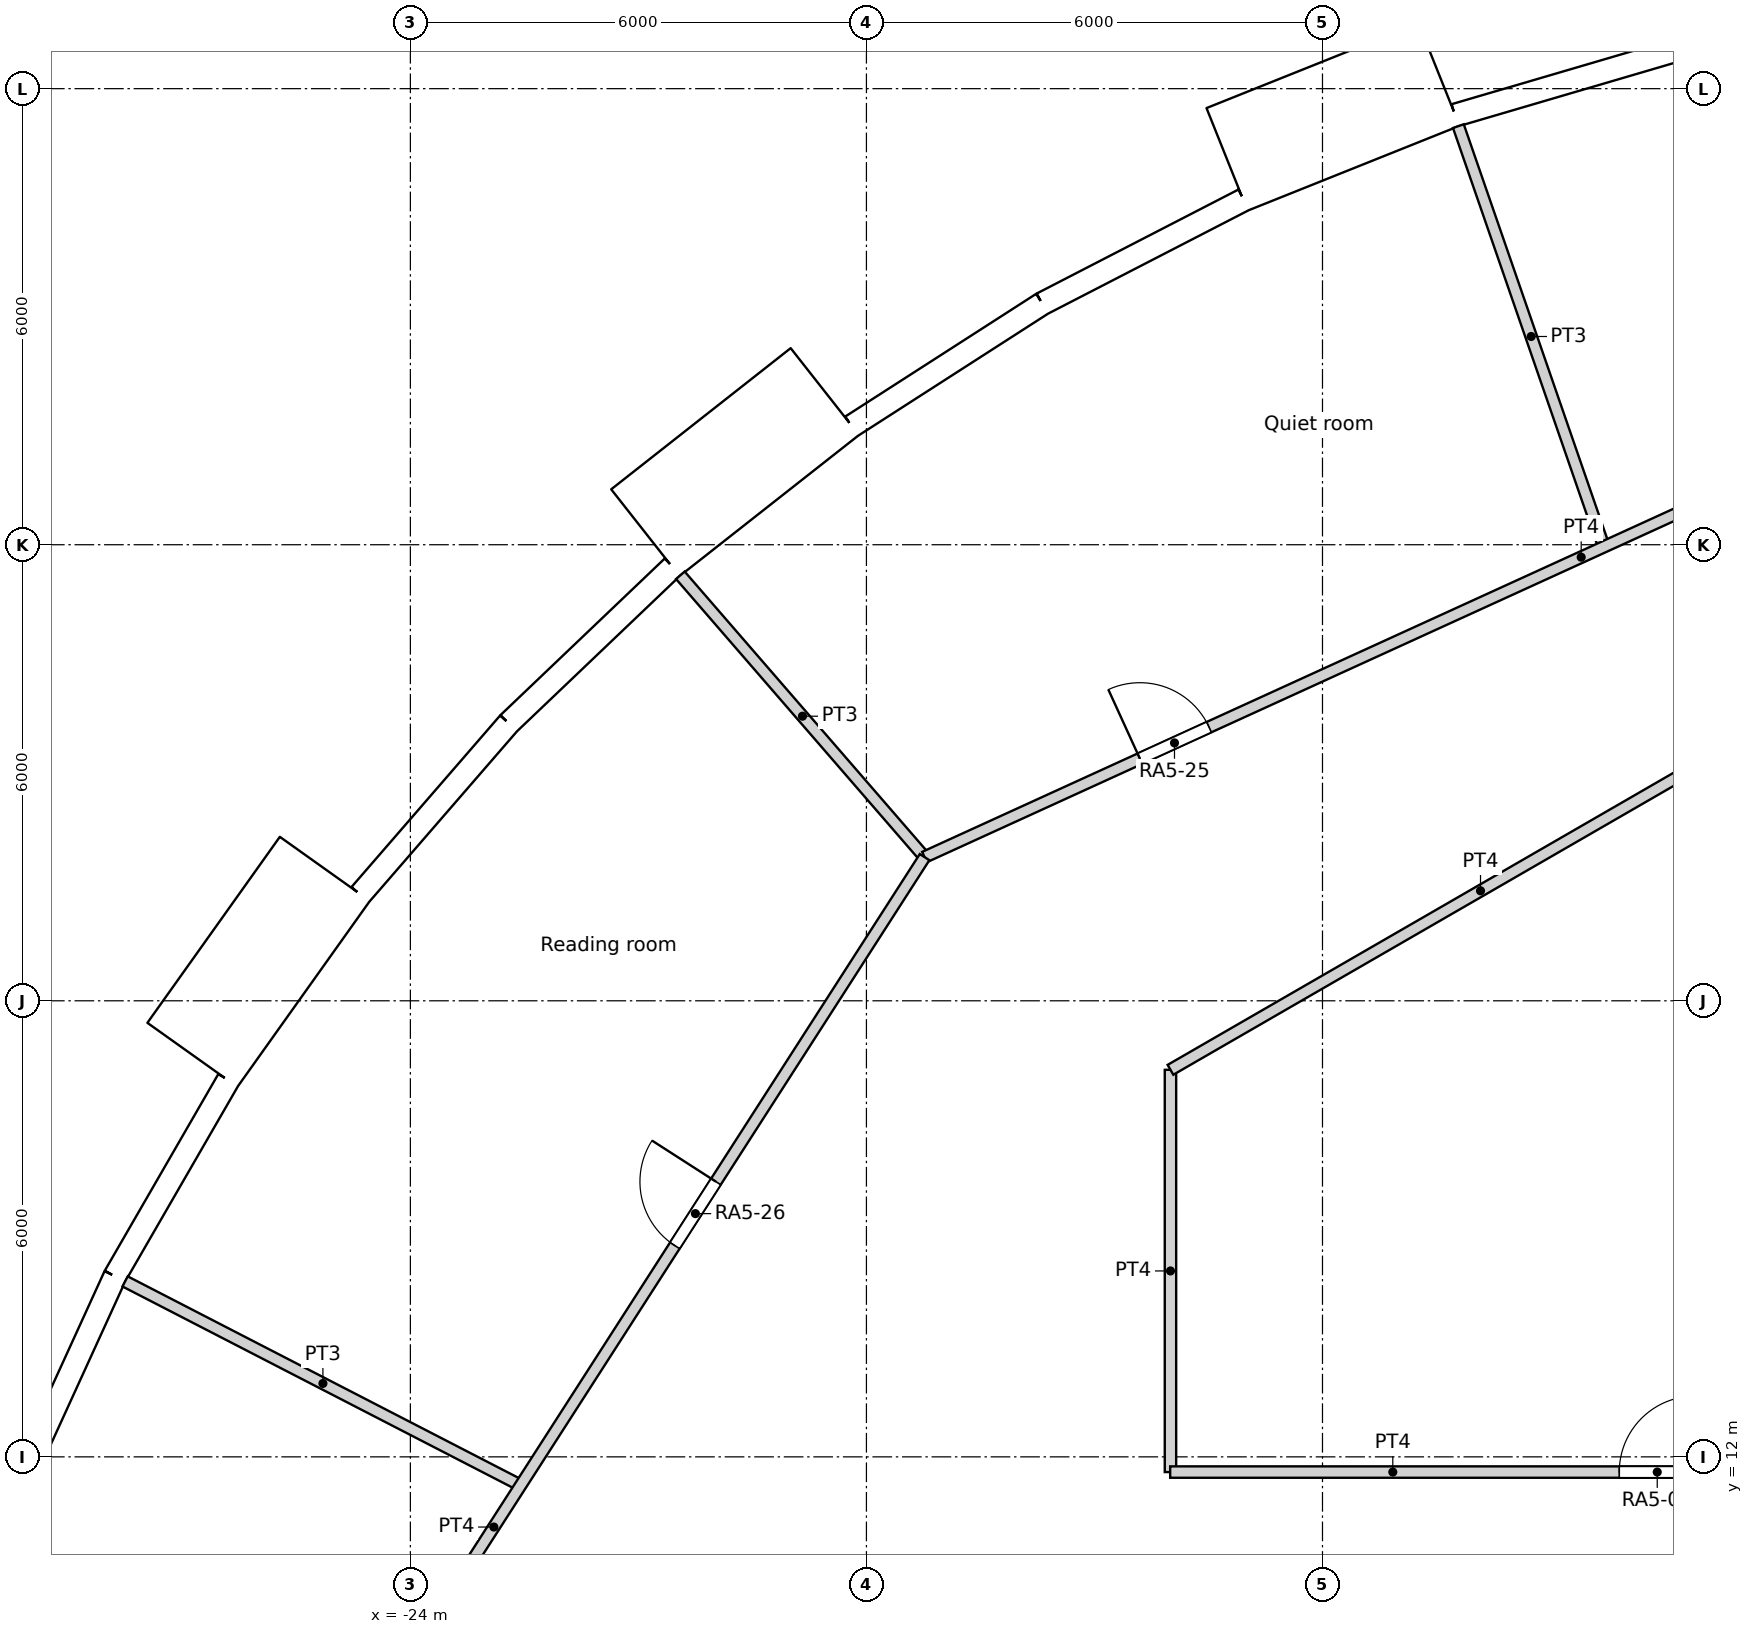
"""IFC4 building model, lengths in metres.
Left out: names, types, materials, properties, quantities, classifications, styles, units other than length and angle.
Written with IfcOpenShell. Run it as: python <this file> out.ifc"""

import sys

from ifc_helpers import new_model, si_unit, direction, frame, frame_2d, origin, origin_2d, place, context, subcontext, project, spatial, rectangle, circle, extrude, element, fill, save


model = new_model("IFC4")
c1 = context("Model", 3, precision=1e-05, world=origin(), true_north=direction((0.0, 1.0)))
c2 = subcontext(c1, "Body", "Model", "MODEL_VIEW")
j1 = project(units=[si_unit("LENGTHUNIT", "METRE"), si_unit("PLANEANGLEUNIT", "RADIAN")], contexts=[c1])
p1 = place(None, origin())
s1 = spatial("IfcSite", under=j1, at=p1, CompositionType="ELEMENT")
p2 = place(p1, origin())
s2 = spatial("IfcBuilding", under=s1, at=p2, CompositionType="ELEMENT")
p3 = place(p2, frame((0.0, 0.0, 71.4)))
s3 = spatial("IfcBuildingStorey", under=s2, at=p3, CompositionType="ELEMENT", Elevation=71.4)
for number, where, z_axis, x_axis in (
    (1, (-9.902, 28.61, 0.0), (0.0, 0.0, 1.0), (1.0, 0.0, 0.0)),
    (2, (-15.137, 26.219, 0.0), (0.0, 0.0, 1.0), (1.0, 0.0, 0.0)),
    (3, (-19.826, 22.88, 0.0), (0.0, 0.0, 1.0), (1.0, 0.0, 0.0)),
    (4, (-23.797, 18.715, 0.0), (0.0, 0.0, 1.0), (1.0, 0.0, 0.0)),
    (5, (-26.909, 13.873, 0.0), (0.0, 0.0, 1.0), (1.0, 0.0, 0.0)),
):
    element("IfcColumn", number, at=place(p3, frame(where, z_axis=z_axis, x_axis=x_axis)), inside=s3, PredefinedType="COLUMN", context=c2, shape_type="SweptSolid", body=[
        extrude(circle(Radius=0.6, at=origin_2d()), origin(), (0.0, 0.0, 1.0), 3.6),
    ])
for number, where, z_axis, x_axis in (
    (6, (-7.04, 23.516, 0.0), (0.0, 0.0, 1.0), (1.0, 0.0, 0.0)),
    (7, (-12.274, 21.259, 0.0), (0.0, 0.0, 1.0), (1.0, 0.0, 0.0)),
    (8, (-16.846, 17.855, 0.0), (0.0, 0.0, 1.0), (1.0, 0.0, 0.0)),
    (9, (-20.509, 13.489, 0.0), (0.0, 0.0, 1.0), (1.0, 0.0, 0.0)),
):
    element("IfcColumn", number, at=place(p3, frame(where, z_axis=z_axis, x_axis=x_axis)), inside=s3, PredefinedType="COLUMN", context=c2, shape_type="SweptSolid", body=[
        extrude(circle(Radius=0.65, at=origin_2d()), origin(), (0.0, 0.0, 1.0), 3.6),
    ])
for number, where, z_axis, x_axis in (
    (10, (-9.411, 16.301, 0.0), (0.0, 0.0, 1.0), (1.0, 0.0, 0.0)),
    (11, (-13.798, 12.802, 0.0), (0.0, 0.0, 1.0), (1.0, 0.0, 0.0)),
):
    element("IfcColumn", number, at=place(p3, frame(where, z_axis=z_axis, x_axis=x_axis)), inside=s3, PredefinedType="COLUMN", context=c2, shape_type="SweptSolid", body=[
        extrude(circle(Radius=0.7, at=origin_2d()), origin(), (0.0, 0.0, 1.0), 3.6),
    ])
p4 = place(p3, frame((-4.471, 31.054, 0.0), z_axis=(0.0, 0.0, 1.0), x_axis=(-0.981924535406, -0.189272836848, 0.0)))
e12 = element("IfcWall", 12, at=p4, inside=s3, PredefinedType="SOLIDWALL", context=c2, shape_type="SweptSolid", body=[
    extrude(rectangle(XDim=2.98, YDim=0.3, at=frame_2d((1.49, 0.0))), origin(), (0.0, 0.0, 1.0), 3.15),
])
p5 = place(p4, frame((1.49, 0.0, 1.55)))
e13 = element("IfcOpeningElement", 13, at=p5, cuts=e12, PredefinedType="OPENING", context=c2, shape_type="SweptSolid", body=[
    extrude(circle(Radius=0.9, at=origin_2d()), frame((0.0, 0.16, 0.0), z_axis=(0.0, -1.0, 0.0), x_axis=(1.0, 0.0, 0.0)), (0.0, 0.0, 1.0), 0.32),
])
p6 = place(p3, frame((-7.397, 30.49, 0.0), z_axis=(0.0, 0.0, 1.0), x_axis=(-0.959507586834, -0.28168278401, 0.0)))
e14 = element("IfcWall", 14, at=p6, inside=s3, PredefinedType="SOLIDWALL", context=c2, shape_type="SweptSolid", body=[
    extrude(rectangle(XDim=2.98, YDim=0.3, at=frame_2d((1.49, 0.0))), origin(), (0.0, 0.0, 1.0), 3.15),
])
p7 = place(p6, frame((1.49, 0.0, 1.55)))
e15 = element("IfcOpeningElement", 15, at=p7, cuts=e14, PredefinedType="OPENING", context=c2, shape_type="SweptSolid", body=[
    extrude(circle(Radius=0.9, at=origin_2d()), frame((0.0, 0.16, 0.0), z_axis=(0.0, -1.0, 0.0), x_axis=(1.0, 0.0, 0.0)), (0.0, 0.0, 1.0), 0.32),
])
p8 = place(p3, frame((-10.469, 30.185, -0.45), z_axis=(0.0, 0.0, 1.0), x_axis=(-0.928358776184, -0.371685327504, 0.0)))
e16 = element("IfcWall", 16, at=p8, inside=s3, PredefinedType="ELEMENTEDWALL", context=c2, shape_type="SweptSolid", body=[
    extrude(rectangle(XDim=3.0, YDim=1.45, at=frame_2d((1.5, 0.0))), origin(), (0.0, 0.0, 1.0), 3.6),
])
p9 = place(p8, frame((1.5, 0.0, 2.0)))
e17 = element("IfcOpeningElement", 17, at=p9, cuts=e16, PredefinedType="OPENING", context=c2, shape_type="SweptSolid", body=[
    extrude(circle(Radius=0.9, at=origin_2d()), frame((0.0, 0.735, 0.0), z_axis=(0.0, -1.0, 0.0), x_axis=(1.0, 0.0, 0.0)), (0.0, 0.0, 1.0), 1.47),
])
p10 = place(p3, frame((-13.039, 28.536, 0.0), z_axis=(0.0, 0.0, 1.0), x_axis=(-0.888853225096, -0.4581920386, 0.0)))
e18 = element("IfcWall", 18, at=p10, inside=s3, PredefinedType="SOLIDWALL", context=c2, shape_type="SweptSolid", body=[
    extrude(rectangle(XDim=2.979, YDim=0.3, at=frame_2d((1.49, 0.0))), origin(), (0.0, 0.0, 1.0), 3.15),
])
p11 = place(p10, frame((1.49, 0.0, 1.55)))
e19 = element("IfcOpeningElement", 19, at=p11, cuts=e18, PredefinedType="OPENING", context=c2, shape_type="SweptSolid", body=[
    extrude(circle(Radius=0.9, at=origin_2d()), frame((0.0, 0.16, 0.0), z_axis=(0.0, -1.0, 0.0), x_axis=(1.0, 0.0, 0.0)), (0.0, 0.0, 1.0), 0.32),
])
p12 = place(p3, frame((-15.687, 27.171, 0.0), z_axis=(0.0, 0.0, 1.0), x_axis=(-0.84122372879, -0.540687190639, 0.0)))
e20 = element("IfcWall", 20, at=p12, inside=s3, PredefinedType="SOLIDWALL", context=c2, shape_type="SweptSolid", body=[
    extrude(rectangle(XDim=2.98, YDim=0.3, at=frame_2d((1.49, 0.0))), origin(), (0.0, 0.0, 1.0), 3.15),
])
p13 = place(p12, frame((1.49, 0.0, 1.55)))
e21 = element("IfcOpeningElement", 21, at=p13, cuts=e20, PredefinedType="OPENING", context=c2, shape_type="SweptSolid", body=[
    extrude(circle(Radius=0.9, at=origin_2d()), frame((0.0, 0.16, 0.0), z_axis=(0.0, -1.0, 0.0), x_axis=(1.0, 0.0, 0.0)), (0.0, 0.0, 1.0), 0.32),
])
p14 = place(p3, frame((-18.549, 26.013, -0.45), z_axis=(0.0, 0.0, 1.0), x_axis=(-0.786049992888, -0.618162930529, 0.0)))
e22 = element("IfcWall", 22, at=p14, inside=s3, PredefinedType="ELEMENTEDWALL", context=c2, shape_type="SweptSolid", body=[
    extrude(rectangle(XDim=3.0, YDim=1.45, at=frame_2d((1.5, 0.0))), origin(), (0.0, 0.0, 1.0), 3.6),
])
p15 = place(p14, frame((1.5, 0.0, 2.0)))
e23 = element("IfcOpeningElement", 23, at=p15, cuts=e22, PredefinedType="OPENING", context=c2, shape_type="SweptSolid", body=[
    extrude(circle(Radius=0.9, at=origin_2d()), frame((0.0, 0.735, 0.0), z_axis=(0.0, -1.0, 0.0), x_axis=(1.0, 0.0, 0.0)), (0.0, 0.0, 1.0), 1.47),
])
p16 = place(p3, frame((-20.55, 23.707, 0.0), z_axis=(0.0, 0.0, 1.0), x_axis=(-0.723744206617, -0.690068346896, 0.0)))
e24 = element("IfcWall", 24, at=p16, inside=s3, PredefinedType="SOLIDWALL", context=c2, shape_type="SweptSolid", body=[
    extrude(rectangle(XDim=2.98, YDim=0.3, at=frame_2d((1.49, 0.0))), origin(), (0.0, 0.0, 1.0), 3.15),
])
p17 = place(p16, frame((1.49, 0.0, 1.55)))
e25 = element("IfcOpeningElement", 25, at=p17, cuts=e24, PredefinedType="OPENING", context=c2, shape_type="SweptSolid", body=[
    extrude(circle(Radius=0.9, at=origin_2d()), frame((0.0, 0.16, 0.0), z_axis=(0.0, -1.0, 0.0), x_axis=(1.0, 0.0, 0.0)), (0.0, 0.0, 1.0), 0.32),
])
p18 = place(p3, frame((-22.707, 21.651, 0.0), z_axis=(0.0, 0.0, 1.0), x_axis=(-0.654830712471, -0.755775587066, 0.0)))
e26 = element("IfcWall", 26, at=p18, inside=s3, PredefinedType="SOLIDWALL", context=c2, shape_type="SweptSolid", body=[
    extrude(rectangle(XDim=2.98, YDim=0.3, at=frame_2d((1.49, 0.0))), origin(), (0.0, 0.0, 1.0), 3.15),
])
p19 = place(p18, frame((1.49, 0.0, 1.55)))
e27 = element("IfcOpeningElement", 27, at=p19, cuts=e26, PredefinedType="OPENING", context=c2, shape_type="SweptSolid", body=[
    extrude(circle(Radius=0.9, at=origin_2d()), frame((0.0, 0.16, 0.0), z_axis=(0.0, -1.0, 0.0), x_axis=(1.0, 0.0, 0.0)), (0.0, 0.0, 1.0), 0.32),
])
p20 = place(p3, frame((-25.126, 19.734, -0.45), z_axis=(0.0, 0.0, 1.0), x_axis=(-0.580090570606, -0.814551981088, 0.0)))
e28 = element("IfcWall", 28, at=p20, inside=s3, PredefinedType="ELEMENTEDWALL", context=c2, shape_type="SweptSolid", body=[
    extrude(rectangle(XDim=3.0, YDim=1.45, at=frame_2d((1.5, 0.0))), origin(), (0.0, 0.0, 1.0), 3.6),
])
p21 = place(p20, frame((1.5, 0.0, 2.0)))
e29 = element("IfcOpeningElement", 29, at=p21, cuts=e28, PredefinedType="OPENING", context=c2, shape_type="SweptSolid", body=[
    extrude(circle(Radius=0.9, at=origin_2d()), frame((0.0, 0.735, 0.0), z_axis=(0.0, -1.0, 0.0), x_axis=(1.0, 0.0, 0.0)), (0.0, 0.0, 1.0), 1.47),
])
p22 = place(p3, frame((-26.397, 16.957, 0.0), z_axis=(0.0, 0.0, 1.0), x_axis=(-0.499999078476, -0.866025935826, 0.0)))
e30 = element("IfcWall", 30, at=p22, inside=s3, PredefinedType="SOLIDWALL", context=c2, shape_type="SweptSolid", body=[
    extrude(rectangle(XDim=2.979, YDim=0.3, at=frame_2d((1.49, 0.0))), origin(), (0.0, 0.0, 1.0), 3.15),
])
p23 = place(p22, frame((1.49, 0.0, 1.55)))
e31 = element("IfcOpeningElement", 31, at=p23, cuts=e30, PredefinedType="OPENING", context=c2, shape_type="SweptSolid", body=[
    extrude(circle(Radius=0.9, at=origin_2d()), frame((0.0, 0.16, 0.0), z_axis=(0.0, -1.0, 0.0), x_axis=(1.0, 0.0, 0.0)), (0.0, 0.0, 1.0), 0.32),
])
p24 = place(p3, frame((-27.887, 14.377, 0.0), z_axis=(0.0, 0.0, 1.0), x_axis=(-0.415407317162, -0.909635509888, 0.0)))
e32 = element("IfcWall", 32, at=p24, inside=s3, PredefinedType="SOLIDWALL", context=c2, shape_type="SweptSolid", body=[
    extrude(rectangle(XDim=2.98, YDim=0.3, at=frame_2d((1.49, 0.0))), origin(), (0.0, 0.0, 1.0), 3.15),
])
p25 = place(p24, frame((1.49, 0.0, 1.55)))
e33 = element("IfcOpeningElement", 33, at=p25, cuts=e32, PredefinedType="OPENING", context=c2, shape_type="SweptSolid", body=[
    extrude(circle(Radius=0.9, at=origin_2d()), frame((0.0, 0.16, 0.0), z_axis=(0.0, -1.0, 0.0), x_axis=(1.0, 0.0, 0.0)), (0.0, 0.0, 1.0), 0.32),
])
p26 = place(p3, frame((-14.004, 11.8, 0.0), z_axis=(0.0, 0.0, 1.0), x_axis=(1.0, 0.0, 0.0)))
e34 = element("IfcWall", 34, at=p26, inside=s3, PredefinedType="PARTITIONING", context=c2, shape_type="SweptSolid", body=[
    extrude(rectangle(XDim=12.816, YDim=0.15, at=frame_2d((6.408, 0.0))), origin(), (0.0, 0.0, 1.0), 3.15),
])
p27 = place(p26, frame((5.908, 0.0, 0.0)))
e35 = element("IfcOpeningElement", 35, at=p27, cuts=e34, PredefinedType="OPENING", context=c2, shape_type="SweptSolid", body=[
    extrude(rectangle(XDim=1.0, YDim=2.04, at=frame_2d((0.5, 1.02))), frame((0.0, 0.075, 0.0), z_axis=(0.0, -1.0, 0.0), x_axis=(1.0, 0.0, 0.0)), (0.0, 0.0, 1.0), 0.15),
])
p28 = place(p3, frame((-14.0, 17.092, 0.0), z_axis=(0.0, 0.0, 1.0), x_axis=(0.86602719091, 0.499996904595, 0.0)))
e36 = element("IfcWall", 36, at=p28, inside=s3, PredefinedType="PARTITIONING", context=c2, shape_type="SweptSolid", body=[
    extrude(rectangle(XDim=9.42, YDim=0.15, at=frame_2d((4.71, 0.0))), origin(), (0.0, 0.0, 1.0), 3.15),
])
p29 = place(p3, frame((-14.0, 11.8, 0.0), z_axis=(0.0, 0.0, 1.0), x_axis=(0.0, 1.0, 0.0)))
e37 = element("IfcWall", 37, at=p29, inside=s3, PredefinedType="PARTITIONING", context=c2, shape_type="SweptSolid", body=[
    extrude(rectangle(XDim=5.292, YDim=0.15, at=frame_2d((2.646, 0.0))), origin(), (0.0, 0.0, 1.0), 3.15),
])
p30 = place(p3, frame((-17.236, 19.891, 0.0), z_axis=(0.0, 0.0, 1.0), x_axis=(0.909645678785, 0.415385049163, 0.0)))
e38 = element("IfcWall", 38, at=p30, inside=s3, PredefinedType="PARTITIONING", context=c2, shape_type="SweptSolid", body=[
    extrude(rectangle(XDim=14.829, YDim=0.15, at=frame_2d((7.415, 0.0))), origin(), (0.0, 0.0, 1.0), 3.15),
])
p31 = place(p30, frame((3.115, 0.0, 0.0)))
e39 = element("IfcOpeningElement", 39, at=p31, cuts=e38, PredefinedType="OPENING", context=c2, shape_type="SweptSolid", body=[
    extrude(rectangle(XDim=1.0, YDim=2.04, at=frame_2d((0.5, 1.02))), frame((0.0, 0.075, 0.0), z_axis=(0.0, -1.0, 0.0), x_axis=(1.0, 0.0, 0.0)), (0.0, 0.0, 1.0), 0.15),
])
p32 = place(p3, frame((-25.255, 7.416, 0.0), z_axis=(0.0, 0.0, 1.0), x_axis=(0.540805851332, 0.841147449123, 0.0)))
e40 = element("IfcWall", 40, at=p32, inside=s3, PredefinedType="PARTITIONING", context=c2, shape_type="SweptSolid", body=[
    extrude(rectangle(XDim=14.829, YDim=0.15, at=frame_2d((7.415, 0.0))), origin(), (0.0, 0.0, 1.0), 3.15),
])
p33 = place(p32, frame((8.754, 0.0, 0.0)))
e41 = element("IfcOpeningElement", 41, at=p33, cuts=e40, PredefinedType="OPENING", context=c2, shape_type="SweptSolid", body=[
    extrude(rectangle(XDim=1.0, YDim=2.04, at=frame_2d((0.5, 1.02))), frame((0.0, 0.075, 0.0), z_axis=(0.0, -1.0, 0.0), x_axis=(1.0, 0.0, 0.0)), (0.0, 0.0, 1.0), 0.15),
])
p34 = place(p3, frame((-10.212, 29.507, 0.0), z_axis=(0.0, 0.0, 1.0), x_axis=(0.32692444056, -0.94505048022, 0.0)))
e42 = element("IfcWall", 42, at=p34, inside=s3, PredefinedType="PARTITIONING", context=c2, shape_type="SweptSolid", body=[
    extrude(rectangle(XDim=5.857, YDim=0.15, at=frame_2d((2.928, 0.0))), origin(), (0.0, 0.0, 1.0), 3.15),
])
p35 = place(p3, frame((-20.448, 23.598, 0.0), z_axis=(0.0, 0.0, 1.0), x_axis=(0.654847179409, -0.755761319214, 0.0)))
e43 = element("IfcWall", 43, at=p35, inside=s3, PredefinedType="PARTITIONING", context=c2, shape_type="SweptSolid", body=[
    extrude(rectangle(XDim=4.906, YDim=0.15, at=frame_2d((2.453, 0.0))), origin(), (0.0, 0.0, 1.0), 3.15),
])
p36 = place(p3, frame((-27.753, 14.308, 0.0), z_axis=(0.0, 0.0, 1.0), x_axis=(0.88877955153, -0.45833493079, 0.0)))
e44 = element("IfcWall", 44, at=p36, inside=s3, PredefinedType="PARTITIONING", context=c2, shape_type="SweptSolid", body=[
    extrude(rectangle(XDim=5.856, YDim=0.15, at=frame_2d((2.928, 0.0))), origin(), (0.0, 0.0, 1.0), 3.15),
])
p37 = place(p7, origin())
e45 = element("IfcWindow", 45, at=p37, inside=s3, PartitioningType="SINGLE_PANEL", PredefinedType="WINDOW", context=c2, shape_type="SweptSolid", body=[
    extrude(circle(Radius=0.9, at=origin_2d()), frame((0.0, 0.12, 0.0), z_axis=(0.0, -1.0, 0.0), x_axis=(1.0, 0.0, 0.0)), (0.0, 0.0, 1.0), 0.1),
])
fill(e15, e45)
p38 = place(p9, origin())
e46 = element("IfcWindow", 46, at=p38, inside=s3, PartitioningType="SINGLE_PANEL", PredefinedType="WINDOW", context=c2, shape_type="SweptSolid", body=[
    extrude(circle(Radius=0.9, at=origin_2d()), frame((0.0, 0.695, 0.0), z_axis=(0.0, -1.0, 0.0), x_axis=(1.0, 0.0, 0.0)), (0.0, 0.0, 1.0), 0.1),
])
fill(e17, e46)
p39 = place(p11, origin())
e47 = element("IfcWindow", 47, at=p39, inside=s3, PartitioningType="SINGLE_PANEL", PredefinedType="WINDOW", context=c2, shape_type="SweptSolid", body=[
    extrude(circle(Radius=0.9, at=origin_2d()), frame((0.0, 0.12, 0.0), z_axis=(0.0, -1.0, 0.0), x_axis=(1.0, 0.0, 0.0)), (0.0, 0.0, 1.0), 0.1),
])
fill(e19, e47)
p40 = place(p13, origin())
e48 = element("IfcWindow", 48, at=p40, inside=s3, PartitioningType="SINGLE_PANEL", PredefinedType="WINDOW", context=c2, shape_type="SweptSolid", body=[
    extrude(circle(Radius=0.9, at=origin_2d()), frame((0.0, 0.12, 0.0), z_axis=(0.0, -1.0, 0.0), x_axis=(1.0, 0.0, 0.0)), (0.0, 0.0, 1.0), 0.1),
])
fill(e21, e48)
p41 = place(p15, origin())
e49 = element("IfcWindow", 49, at=p41, inside=s3, PartitioningType="SINGLE_PANEL", PredefinedType="WINDOW", context=c2, shape_type="SweptSolid", body=[
    extrude(circle(Radius=0.9, at=origin_2d()), frame((0.0, 0.695, 0.0), z_axis=(0.0, -1.0, 0.0), x_axis=(1.0, 0.0, 0.0)), (0.0, 0.0, 1.0), 0.1),
])
fill(e23, e49)
p42 = place(p17, origin())
e50 = element("IfcWindow", 50, at=p42, inside=s3, PartitioningType="SINGLE_PANEL", PredefinedType="WINDOW", context=c2, shape_type="SweptSolid", body=[
    extrude(circle(Radius=0.9, at=origin_2d()), frame((0.0, 0.12, 0.0), z_axis=(0.0, -1.0, 0.0), x_axis=(1.0, 0.0, 0.0)), (0.0, 0.0, 1.0), 0.1),
])
fill(e25, e50)
p43 = place(p19, origin())
e51 = element("IfcWindow", 51, at=p43, inside=s3, PartitioningType="SINGLE_PANEL", PredefinedType="WINDOW", context=c2, shape_type="SweptSolid", body=[
    extrude(circle(Radius=0.9, at=origin_2d()), frame((0.0, 0.12, 0.0), z_axis=(0.0, -1.0, 0.0), x_axis=(1.0, 0.0, 0.0)), (0.0, 0.0, 1.0), 0.1),
])
fill(e27, e51)
p44 = place(p21, origin())
e52 = element("IfcWindow", 52, at=p44, inside=s3, PartitioningType="SINGLE_PANEL", PredefinedType="WINDOW", context=c2, shape_type="SweptSolid", body=[
    extrude(circle(Radius=0.9, at=origin_2d()), frame((0.0, 0.695, 0.0), z_axis=(0.0, -1.0, 0.0), x_axis=(1.0, 0.0, 0.0)), (0.0, 0.0, 1.0), 0.1),
])
fill(e29, e52)
p45 = place(p23, origin())
e53 = element("IfcWindow", 53, at=p45, inside=s3, PartitioningType="SINGLE_PANEL", PredefinedType="WINDOW", context=c2, shape_type="SweptSolid", body=[
    extrude(circle(Radius=0.9, at=origin_2d()), frame((0.0, 0.12, 0.0), z_axis=(0.0, -1.0, 0.0), x_axis=(1.0, 0.0, 0.0)), (0.0, 0.0, 1.0), 0.1),
])
fill(e31, e53)
p46 = place(p25, origin())
e54 = element("IfcWindow", 54, at=p46, inside=s3, PartitioningType="SINGLE_PANEL", PredefinedType="WINDOW", context=c2, shape_type="SweptSolid", body=[
    extrude(circle(Radius=0.9, at=origin_2d()), frame((0.0, 0.12, 0.0), z_axis=(0.0, -1.0, 0.0), x_axis=(1.0, 0.0, 0.0)), (0.0, 0.0, 1.0), 0.1),
])
fill(e33, e54)
p47 = place(p27, origin())
e55 = element("IfcDoor", 55, at=p47, inside=s3, OperationType="SINGLE_SWING_RIGHT", PredefinedType="DOOR", context=c2, shape_type="SweptSolid", body=[
    extrude(rectangle(XDim=1.0, YDim=2.04, at=frame_2d((0.5, 1.02))), frame((0.0, 0.025, 0.0), z_axis=(0.0, -1.0, 0.0), x_axis=(1.0, 0.0, 0.0)), (0.0, 0.0, 1.0), 0.05),
])
fill(e35, e55)
p48 = place(p31, origin())
e56 = element("IfcDoor", 56, at=p48, inside=s3, OperationType="SINGLE_SWING_LEFT", PredefinedType="DOOR", context=c2, shape_type="SweptSolid", body=[
    extrude(rectangle(XDim=1.0, YDim=2.04, at=frame_2d((0.5, 1.02))), frame((0.0, 0.025, 0.0), z_axis=(0.0, -1.0, 0.0), x_axis=(1.0, 0.0, 0.0)), (0.0, 0.0, 1.0), 0.05),
])
fill(e39, e56)
p49 = place(p33, origin())
e57 = element("IfcDoor", 57, at=p49, inside=s3, OperationType="SINGLE_SWING_RIGHT", PredefinedType="DOOR", context=c2, shape_type="SweptSolid", body=[
    extrude(rectangle(XDim=1.0, YDim=2.04, at=frame_2d((0.5, 1.02))), frame((0.0, 0.025, 0.0), z_axis=(0.0, -1.0, 0.0), x_axis=(1.0, 0.0, 0.0)), (0.0, 0.0, 1.0), 0.05),
])
fill(e41, e57)
save(model, sys.argv[1])
